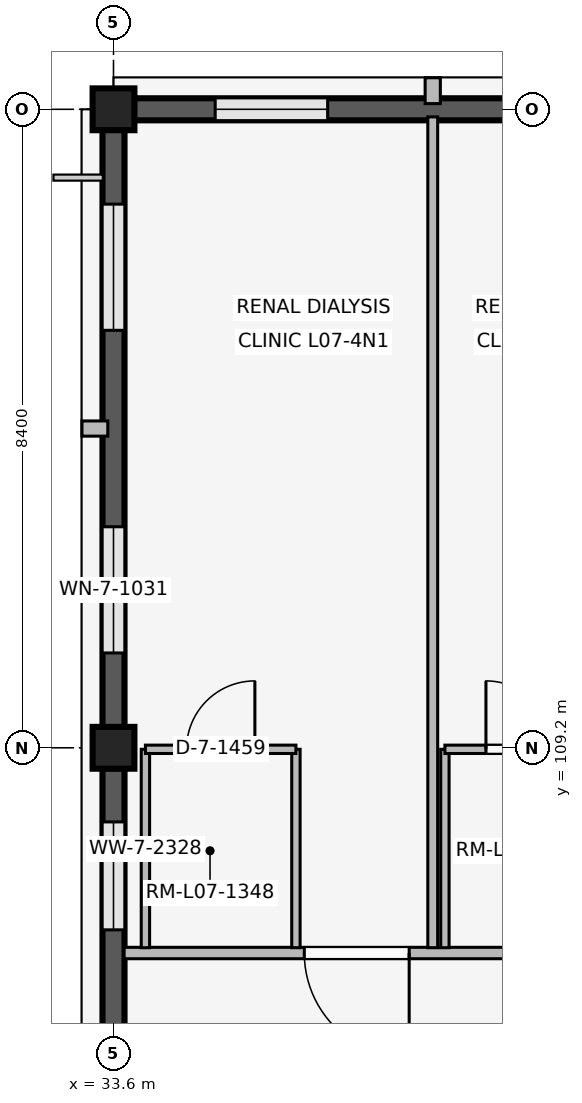
"""IFC4 building model, lengths in metres.
Left out: names, types, materials, properties, quantities, classifications, styles, units other than length and angle.
Written with IfcOpenShell. Run it as: python <this file> out.ifc"""

import sys

from ifc_helpers import new_model, si_unit, direction, frame, frame_2d, origin, origin_2d, place, context, subcontext, project, spatial, rectangle, extrude, element, fill, save


model = new_model("IFC4")
c1 = context("Model", 3, precision=1e-05, world=origin(), true_north=direction((0.0, 1.0)))
c2 = subcontext(c1, "Body", "Model", "MODEL_VIEW")
j1 = project(units=[si_unit("LENGTHUNIT", "METRE"), si_unit("PLANEANGLEUNIT", "RADIAN")], contexts=[c1])
p1 = place(None, origin())
s1 = spatial("IfcSite", under=j1, at=p1, CompositionType="ELEMENT")
p2 = place(p1, origin())
s2 = spatial("IfcBuilding", under=s1, at=p2, CompositionType="ELEMENT")
p3 = place(p2, frame((0.0, 0.0, 28.8)))
s3 = spatial("IfcBuildingStorey", under=s2, at=p3, CompositionType="ELEMENT", Elevation=28.8)
for number, where, z_axis, x_axis in (
    (1, (33.6, 109.2, 0.0), (0.0, 0.0, 1.0), (1.0, 0.0, 0.0)),
    (2, (33.6, 117.6, 0.0), (0.0, 0.0, 1.0), (1.0, 0.0, 0.0)),
):
    element("IfcColumn", number, at=place(p3, frame(where, z_axis=z_axis, x_axis=x_axis)), inside=s3, PredefinedType="COLUMN", context=c2, shape_type="SweptSolid", body=[
        extrude(rectangle(XDim=0.55, YDim=0.55, at=origin_2d()), origin(), (0.0, 0.0, 1.0), 4.2),
    ])
p4 = place(p3, frame((33.6, 101.07, 0.0), z_axis=(0.0, 0.0, 1.0), x_axis=(0.0, 1.0, 0.0)))
e3 = element("IfcWall", 3, at=p4, inside=s3, PredefinedType="SOLIDWALL", context=c2, shape_type="SweptSolid", body=[
    extrude(rectangle(XDim=7.86, YDim=0.29, at=frame_2d((3.93, 0.0))), origin(), (0.0, 0.0, 1.0), 3.34),
])
p5 = place(p4, frame((0.755, 0.0, 0.85)))
e4 = element("IfcOpeningElement", 4, at=p5, cuts=e3, PredefinedType="OPENING", context=c2, shape_type="SweptSolid", body=[
    extrude(rectangle(XDim=1.42, YDim=1.45, at=frame_2d((0.71, 0.725))), frame((0.0, 0.155, 0.0), z_axis=(0.0, -1.0, 0.0), x_axis=(1.0, 0.0, 0.0)), (0.0, 0.0, 1.0), 0.31),
])
p6 = place(p4, frame((5.735, 0.0, 0.85)))
e5 = element("IfcOpeningElement", 5, at=p6, cuts=e3, PredefinedType="OPENING", context=c2, shape_type="SweptSolid", body=[
    extrude(rectangle(XDim=1.42, YDim=1.45, at=frame_2d((0.71, 0.725))), frame((0.0, 0.155, 0.0), z_axis=(0.0, -1.0, 0.0), x_axis=(1.0, 0.0, 0.0)), (0.0, 0.0, 1.0), 0.31),
])
p7 = place(p3, frame((33.87, 117.6, 0.0), z_axis=(0.0, 0.0, 1.0), x_axis=(1.0, 0.0, 0.0)))
e6 = element("IfcWall", 6, at=p7, inside=s3, PredefinedType="SOLIDWALL", context=c2, shape_type="SweptSolid", body=[
    extrude(rectangle(XDim=7.86, YDim=0.29, at=frame_2d((3.93, 0.0))), origin(), (0.0, 0.0, 1.0), 3.34),
])
p8 = place(p7, frame((1.068, 0.0, 0.85)))
e7 = element("IfcOpeningElement", 7, at=p8, cuts=e6, PredefinedType="OPENING", context=c2, shape_type="SweptSolid", body=[
    extrude(rectangle(XDim=1.48, YDim=1.6, at=frame_2d((0.74, 0.8))), frame((0.0, 0.155, 0.0), z_axis=(0.0, -1.0, 0.0), x_axis=(1.0, 0.0, 0.0)), (0.0, 0.0, 1.0), 0.31),
])
p9 = place(p7, frame((5.312, 0.0, 0.85)))
e8 = element("IfcOpeningElement", 8, at=p9, cuts=e6, PredefinedType="OPENING", context=c2, shape_type="SweptSolid", body=[
    extrude(rectangle(XDim=1.48, YDim=1.6, at=frame_2d((0.74, 0.8))), frame((0.0, 0.155, 0.0), z_axis=(0.0, -1.0, 0.0), x_axis=(1.0, 0.0, 0.0)), (0.0, 0.0, 1.0), 0.31),
])
p10 = place(p3, frame((37.8, 117.675, 0.0), z_axis=(0.0, 0.0, 1.0), x_axis=(0.0, 1.0, 0.0)))
e9 = element("IfcWall", 9, at=p10, inside=s3, PredefinedType="ELEMENTEDWALL", context=c2, shape_type="SweptSolid", body=[
    extrude(rectangle(XDim=0.34, YDim=0.2, at=frame_2d((0.17, 0.0))), origin(), (0.0, 0.0, 1.0), 3.32),
])
p11 = place(p3, frame((33.6, 109.47, 0.0), z_axis=(0.0, 0.0, 1.0), x_axis=(0.0, 1.0, 0.0)))
e10 = element("IfcWall", 10, at=p11, inside=s3, PredefinedType="SOLIDWALL", context=c2, shape_type="SweptSolid", body=[
    extrude(rectangle(XDim=7.86, YDim=0.29, at=frame_2d((3.93, 0.0))), origin(), (0.0, 0.0, 1.0), 3.34),
])
p12 = place(p11, frame((0.978, 0.0, 0.85)))
e11 = element("IfcOpeningElement", 11, at=p12, cuts=e10, PredefinedType="OPENING", context=c2, shape_type="SweptSolid", body=[
    extrude(rectangle(XDim=1.66, YDim=1.95, at=frame_2d((0.83, 0.975))), frame((0.0, 0.155, 0.0), z_axis=(0.0, -1.0, 0.0), x_axis=(1.0, 0.0, 0.0)), (0.0, 0.0, 1.0), 0.31),
])
p13 = place(p11, frame((5.222, 0.0, 0.85)))
e12 = element("IfcOpeningElement", 12, at=p13, cuts=e10, PredefinedType="OPENING", context=c2, shape_type="SweptSolid", body=[
    extrude(rectangle(XDim=1.66, YDim=1.95, at=frame_2d((0.83, 0.975))), frame((0.0, 0.155, 0.0), z_axis=(0.0, -1.0, 0.0), x_axis=(1.0, 0.0, 0.0)), (0.0, 0.0, 1.0), 0.31),
])
p14 = place(p3, frame((33.525, 113.4, 0.0), z_axis=(0.0, 0.0, 1.0), x_axis=(-1.0, 0.0, 0.0)))
e13 = element("IfcWall", 13, at=p14, inside=s3, PredefinedType="ELEMENTEDWALL", context=c2, shape_type="SweptSolid", body=[
    extrude(rectangle(XDim=0.34, YDim=0.2, at=frame_2d((0.17, 0.0))), origin(), (0.0, 0.0, 1.0), 3.32),
])
p15 = place(p3, frame((41.64, 106.5, 0.0), z_axis=(0.0, 0.0, 1.0), x_axis=(-1.0, 0.0, 0.0)))
e14 = element("IfcWall", 14, at=p15, inside=s3, PredefinedType="PARTITIONING", context=c2, shape_type="SweptSolid", body=[
    extrude(rectangle(XDim=7.9, YDim=0.15, at=frame_2d((3.95, 0.0))), origin(), (0.0, 0.0, 1.0), 3.32),
])
p16 = place(p15, frame((0.45, 0.0, 0.0)))
e15 = element("IfcOpeningElement", 15, at=p16, cuts=e14, PredefinedType="OPENING", context=c2, shape_type="SweptSolid", body=[
    extrude(rectangle(XDim=1.38, YDim=2.25, at=frame_2d((0.69, 1.125))), frame((0.0, 0.085, 0.0), z_axis=(0.0, -1.0, 0.0), x_axis=(1.0, 0.0, 0.0)), (0.0, 0.0, 1.0), 0.17),
])
p17 = place(p15, frame((4.15, 0.0, 0.0)))
e16 = element("IfcOpeningElement", 16, at=p17, cuts=e14, PredefinedType="OPENING", context=c2, shape_type="SweptSolid", body=[
    extrude(rectangle(XDim=1.38, YDim=2.25, at=frame_2d((0.69, 1.125))), frame((0.0, 0.085, 0.0), z_axis=(0.0, -1.0, 0.0), x_axis=(1.0, 0.0, 0.0)), (0.0, 0.0, 1.0), 0.17),
])
p18 = place(p3, frame((37.8, 106.57, 0.0), z_axis=(0.0, 0.0, 1.0), x_axis=(0.0, 1.0, 0.0)))
e17 = element("IfcWall", 17, at=p18, inside=s3, PredefinedType="PARTITIONING", context=c2, shape_type="SweptSolid", body=[
    extrude(rectangle(XDim=10.93, YDim=0.13, at=frame_2d((5.465, 0.0))), origin(), (0.0, 0.0, 1.0), 3.32),
])
for number, where, z_axis, x_axis in (
    (18, (34.02, 106.57, 0.0), (0.0, 0.0, 1.0), (0.0, 1.0, 0.0)),
    (19, (36.0, 106.57, 0.0), (0.0, 0.0, 1.0), (0.0, 1.0, 0.0)),
):
    element("IfcWall", number, at=place(p3, frame(where, z_axis=z_axis, x_axis=x_axis)), inside=s3, PredefinedType="PARTITIONING", context=c2, shape_type="SweptSolid", body=[
        extrude(rectangle(XDim=2.61, YDim=0.11, at=frame_2d((1.305, 0.0))), origin(), (0.0, 0.0, 1.0), 3.32),
    ])
p19 = place(p3, frame((34.02, 109.18, 0.0), z_axis=(0.0, 0.0, 1.0), x_axis=(1.0, 0.0, 0.0)))
e20 = element("IfcWall", 20, at=p19, inside=s3, PredefinedType="PARTITIONING", context=c2, shape_type="SweptSolid", body=[
    extrude(rectangle(XDim=1.98, YDim=0.11, at=frame_2d((0.99, 0.0))), origin(), (0.0, 0.0, 1.0), 3.32),
])
p20 = place(p19, frame((0.54, 0.0, 0.0)))
e21 = element("IfcOpeningElement", 21, at=p20, cuts=e20, PredefinedType="OPENING", context=c2, shape_type="SweptSolid", body=[
    extrude(rectangle(XDim=0.9, YDim=2.1, at=frame_2d((0.45, 1.05))), frame((0.0, 0.065, 0.0), z_axis=(0.0, -1.0, 0.0), x_axis=(1.0, 0.0, 0.0)), (0.0, 0.0, 1.0), 0.13),
])
p21 = place(p3, frame((37.96, 106.57, 0.0), z_axis=(0.0, 0.0, 1.0), x_axis=(0.0, 1.0, 0.0)))
e22 = element("IfcWall", 22, at=p21, inside=s3, PredefinedType="PARTITIONING", context=c2, shape_type="SweptSolid", body=[
    extrude(rectangle(XDim=2.61, YDim=0.11, at=frame_2d((1.305, 0.0))), origin(), (0.0, 0.0, 1.0), 3.32),
])
p22 = place(p3, frame((37.96, 109.18, 0.0), z_axis=(0.0, 0.0, 1.0), x_axis=(1.0, 0.0, 0.0)))
e23 = element("IfcWall", 23, at=p22, inside=s3, PredefinedType="PARTITIONING", context=c2, shape_type="SweptSolid", body=[
    extrude(rectangle(XDim=1.98, YDim=0.11, at=frame_2d((0.99, 0.0))), origin(), (0.0, 0.0, 1.0), 3.32),
])
p23 = place(p22, frame((0.54, 0.0, 0.0)))
e24 = element("IfcOpeningElement", 24, at=p23, cuts=e23, PredefinedType="OPENING", context=c2, shape_type="SweptSolid", body=[
    extrude(rectangle(XDim=0.9, YDim=2.1, at=frame_2d((0.45, 1.05))), frame((0.0, 0.065, 0.0), z_axis=(0.0, -1.0, 0.0), x_axis=(1.0, 0.0, 0.0)), (0.0, 0.0, 1.0), 0.13),
])
p24 = place(p6, origin())
e25 = element("IfcWindow", 25, at=p24, inside=s3, PartitioningType="SINGLE_PANEL", PredefinedType="WINDOW", context=c2, shape_type="SweptSolid", body=[
    extrude(rectangle(XDim=1.42, YDim=1.45, at=frame_2d((0.71, 0.725))), frame((0.0, 0.03, 0.0), z_axis=(0.0, -1.0, 0.0), x_axis=(1.0, 0.0, 0.0)), (0.0, 0.0, 1.0), 0.06),
])
fill(e5, e25)
p25 = place(p8, origin())
e26 = element("IfcWindow", 26, at=p25, inside=s3, PartitioningType="SINGLE_PANEL", PredefinedType="WINDOW", context=c2, shape_type="SweptSolid", body=[
    extrude(rectangle(XDim=1.48, YDim=1.6, at=frame_2d((0.74, 0.8))), frame((0.0, 0.03, 0.0), z_axis=(0.0, -1.0, 0.0), x_axis=(1.0, 0.0, 0.0)), (0.0, 0.0, 1.0), 0.06),
])
fill(e7, e26)
p26 = place(p12, origin())
e27 = element("IfcWindow", 27, at=p26, inside=s3, PartitioningType="SINGLE_PANEL", PredefinedType="WINDOW", context=c2, shape_type="SweptSolid", body=[
    extrude(rectangle(XDim=1.66, YDim=1.95, at=frame_2d((0.83, 0.975))), frame((0.0, 0.03, 0.0), z_axis=(0.0, -1.0, 0.0), x_axis=(1.0, 0.0, 0.0)), (0.0, 0.0, 1.0), 0.06),
])
fill(e11, e27)
p27 = place(p13, origin())
e28 = element("IfcWindow", 28, at=p27, inside=s3, PartitioningType="SINGLE_PANEL", PredefinedType="WINDOW", context=c2, shape_type="SweptSolid", body=[
    extrude(rectangle(XDim=1.66, YDim=1.95, at=frame_2d((0.83, 0.975))), frame((0.0, 0.03, 0.0), z_axis=(0.0, -1.0, 0.0), x_axis=(1.0, 0.0, 0.0)), (0.0, 0.0, 1.0), 0.06),
])
fill(e12, e28)
p28 = place(p17, origin())
e29 = element("IfcDoor", 29, at=p28, inside=s3, OperationType="SINGLE_SWING_LEFT", PredefinedType="DOOR", context=c2, shape_type="SweptSolid", body=[
    extrude(rectangle(XDim=1.38, YDim=2.25, at=frame_2d((0.69, 1.125))), frame((0.0, 0.025, 0.0), z_axis=(0.0, -1.0, 0.0), x_axis=(1.0, 0.0, 0.0)), (0.0, 0.0, 1.0), 0.05),
])
fill(e16, e29)
p29 = place(p20, origin())
e30 = element("IfcDoor", 30, at=p29, inside=s3, OperationType="SINGLE_SWING_RIGHT", PredefinedType="DOOR", context=c2, shape_type="SweptSolid", body=[
    extrude(rectangle(XDim=0.9, YDim=2.1, at=frame_2d((0.45, 1.05))), frame((0.0, 0.025, 0.0), z_axis=(0.0, -1.0, 0.0), x_axis=(1.0, 0.0, 0.0)), (0.0, 0.0, 1.0), 0.05),
])
fill(e21, e30)
p30 = place(p23, origin())
e31 = element("IfcDoor", 31, at=p30, inside=s3, OperationType="SINGLE_SWING_LEFT", PredefinedType="DOOR", context=c2, shape_type="SweptSolid", body=[
    extrude(rectangle(XDim=0.9, YDim=2.1, at=frame_2d((0.45, 1.05))), frame((0.0, 0.025, 0.0), z_axis=(0.0, -1.0, 0.0), x_axis=(1.0, 0.0, 0.0)), (0.0, 0.0, 1.0), 0.05),
])
fill(e24, e31)
save(model, sys.argv[1])
